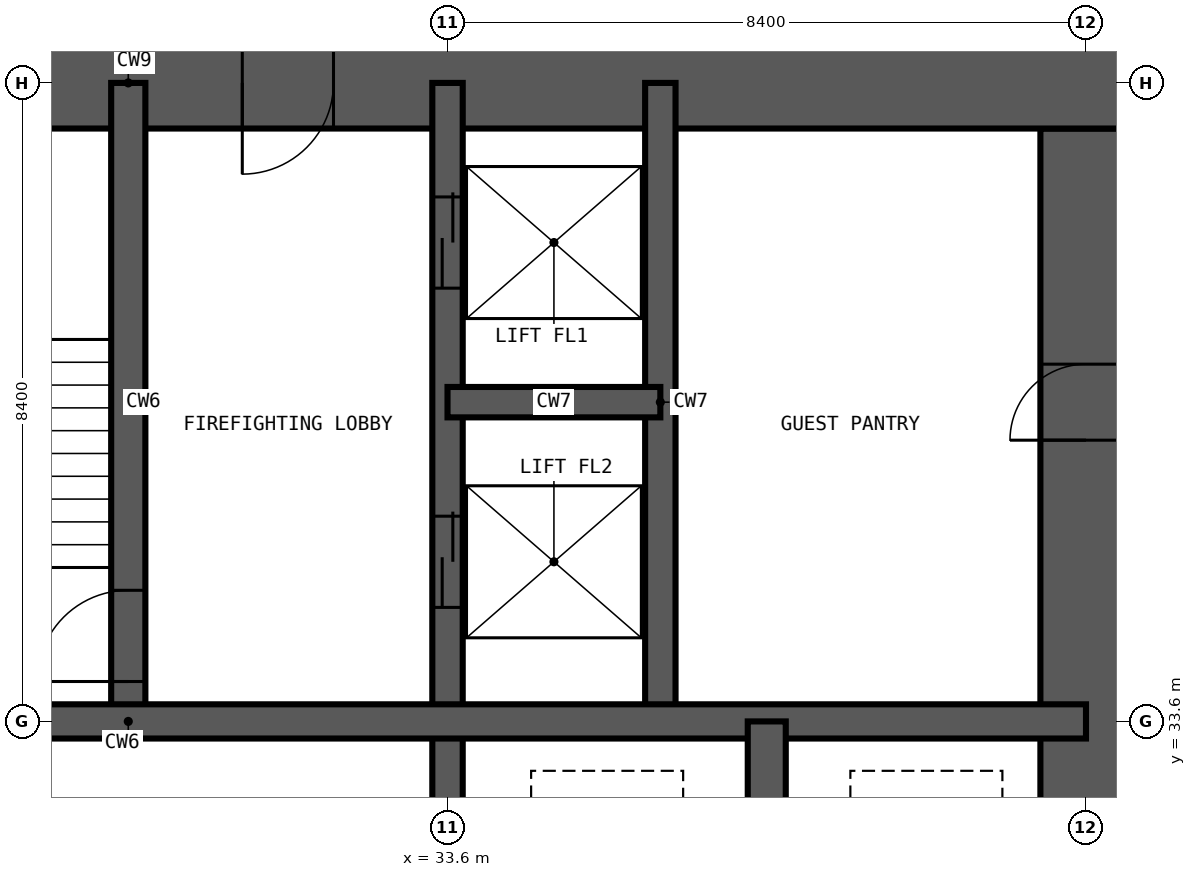
"""IFC4 building model, lengths in metres.
Left out: names, types, materials, properties, quantities, classifications, styles, units other than length and angle.
Written with IfcOpenShell. Run it as: python <this file> out.ifc"""

import sys

from ifc_helpers import new_model, si_unit, direction, frame, frame_2d, origin, place, context, subcontext, project, spatial, rectangle, extrude, element, fill, save


model = new_model("IFC4")
c1 = context("Model", 3, precision=1e-05, world=origin(), true_north=direction((0.0, 1.0)))
c2 = subcontext(c1, "Body", "Model", "MODEL_VIEW")
j1 = project(units=[si_unit("LENGTHUNIT", "METRE"), si_unit("PLANEANGLEUNIT", "RADIAN")], contexts=[c1])
p1 = place(None, origin())
s1 = spatial("IfcSite", under=j1, at=p1, CompositionType="ELEMENT")
p2 = place(p1, origin())
s2 = spatial("IfcBuilding", under=s1, at=p2, CompositionType="ELEMENT")
p3 = place(p2, frame((0.0, 0.0, 159.0)))
s3 = spatial("IfcBuildingStorey", under=s2, at=p3, CompositionType="ELEMENT", Elevation=159.0)
p4 = place(p3, frame((42.0, 17.4, -0.35), z_axis=(0.0, 0.0, 1.0), x_axis=(0.0, 1.0, 0.0)))
e1 = element("IfcWall", 1, at=p4, inside=s3, PredefinedType="SHEAR", context=c2, shape_type="SweptSolid", body=[
    extrude(rectangle(XDim=24.0, YDim=1.2, at=frame_2d((12.0, 0.0))), origin(), (0.0, 0.0, 1.0), 3.6),
])
p5 = place(p4, frame((0.2, 0.0, 0.35)))
e2 = element("IfcOpeningElement", 2, at=p5, cuts=e1, PredefinedType="OPENING", context=c2, shape_type="SweptSolid", body=[
    extrude(rectangle(XDim=1.2, YDim=2.2, at=frame_2d((0.6, 1.1))), frame((0.0, 0.61, 0.0), z_axis=(0.0, -1.0, 0.0), x_axis=(1.0, 0.0, 0.0)), (0.0, 0.0, 1.0), 1.22),
])
p6 = place(p4, frame((11.5, 0.0, 0.35)))
e3 = element("IfcOpeningElement", 3, at=p6, cuts=e1, PredefinedType="OPENING", context=c2, shape_type="SweptSolid", body=[
    extrude(rectangle(XDim=1.0, YDim=2.1, at=frame_2d((0.5, 1.05))), frame((0.0, 0.61, 0.0), z_axis=(0.0, -1.0, 0.0), x_axis=(1.0, 0.0, 0.0)), (0.0, 0.0, 1.0), 1.22),
])
p7 = place(p4, frame((19.9, 0.0, 0.35)))
e4 = element("IfcOpeningElement", 4, at=p7, cuts=e1, PredefinedType="OPENING", context=c2, shape_type="SweptSolid", body=[
    extrude(rectangle(XDim=1.0, YDim=2.1, at=frame_2d((0.5, 1.05))), frame((0.0, 0.61, 0.0), z_axis=(0.0, -1.0, 0.0), x_axis=(1.0, 0.0, 0.0)), (0.0, 0.0, 1.0), 1.22),
])
p8 = place(p3, frame((42.6, 42.0, -0.35), z_axis=(0.0, 0.0, 1.0), x_axis=(-1.0, 0.0, 0.0)))
e5 = element("IfcWall", 5, at=p8, inside=s3, PredefinedType="SHEAR", context=c2, shape_type="SweptSolid", body=[
    extrude(rectangle(XDim=26.4, YDim=1.2, at=frame_2d((13.2, 0.0))), origin(), (0.0, 0.0, 1.0), 3.6),
])
p9 = place(p8, frame((21.1, 0.0, 0.35)))
e6 = element("IfcOpeningElement", 6, at=p9, cuts=e5, PredefinedType="OPENING", context=c2, shape_type="SweptSolid", body=[
    extrude(rectangle(XDim=1.0, YDim=2.1, at=frame_2d((0.5, 1.05))), frame((0.0, 0.61, 0.0), z_axis=(0.0, -1.0, 0.0), x_axis=(1.0, 0.0, 0.0)), (0.0, 0.0, 1.0), 1.22),
])
p10 = place(p8, frame((10.5, 0.0, 0.35)))
e7 = element("IfcOpeningElement", 7, at=p10, cuts=e5, PredefinedType="OPENING", context=c2, shape_type="SweptSolid", body=[
    extrude(rectangle(XDim=1.2, YDim=2.2, at=frame_2d((0.6, 1.1))), frame((0.0, 0.61, 0.0), z_axis=(0.0, -1.0, 0.0), x_axis=(1.0, 0.0, 0.0)), (0.0, 0.0, 1.0), 1.22),
])
p11 = place(p3, frame((33.6, 16.8, -0.35), z_axis=(0.0, 0.0, 1.0), x_axis=(0.0, 1.0, 0.0)))
e8 = element("IfcWall", 8, at=p11, inside=s3, PredefinedType="SHEAR", context=c2, shape_type="SweptSolid", body=[
    extrude(rectangle(XDim=25.2, YDim=0.4, at=frame_2d((12.6, 0.0))), origin(), (0.0, 0.0, 1.0), 3.6),
])
p12 = place(p11, frame((22.5, 0.0, 0.35)))
e9 = element("IfcOpeningElement", 9, at=p12, cuts=e8, PredefinedType="OPENING", context=c2, shape_type="SweptSolid", body=[
    extrude(rectangle(XDim=1.2, YDim=2.2, at=frame_2d((0.6, 1.1))), frame((0.0, 0.21, 0.0), z_axis=(0.0, -1.0, 0.0), x_axis=(1.0, 0.0, 0.0)), (0.0, 0.0, 1.0), 0.42),
])
p13 = place(p11, frame((18.3, 0.0, 0.35)))
e10 = element("IfcOpeningElement", 10, at=p13, cuts=e8, PredefinedType="OPENING", context=c2, shape_type="SweptSolid", body=[
    extrude(rectangle(XDim=1.2, YDim=2.2, at=frame_2d((0.6, 1.1))), frame((0.0, 0.21, 0.0), z_axis=(0.0, -1.0, 0.0), x_axis=(1.0, 0.0, 0.0)), (0.0, 0.0, 1.0), 0.42),
])
p14 = place(p11, frame((12.1, 0.0, 0.35)))
e11 = element("IfcOpeningElement", 11, at=p14, cuts=e8, PredefinedType="OPENING", context=c2, shape_type="SweptSolid", body=[
    extrude(rectangle(XDim=1.0, YDim=2.1, at=frame_2d((0.5, 1.05))), frame((0.0, 0.21, 0.0), z_axis=(0.0, -1.0, 0.0), x_axis=(1.0, 0.0, 0.0)), (0.0, 0.0, 1.0), 0.42),
])
p15 = place(p3, frame((36.4, 33.6, -0.35), z_axis=(0.0, 0.0, 1.0), x_axis=(0.0, 1.0, 0.0)))
e12 = element("IfcWall", 12, at=p15, inside=s3, PredefinedType="SHEAR", context=c2, shape_type="SweptSolid", body=[
    extrude(rectangle(XDim=8.4, YDim=0.4, at=frame_2d((4.2, 0.0))), origin(), (0.0, 0.0, 1.0), 3.6),
])
p16 = place(p3, frame((33.6, 37.8, -0.35), z_axis=(0.0, 0.0, 1.0), x_axis=(1.0, 0.0, 0.0)))
e13 = element("IfcWall", 13, at=p16, inside=s3, PredefinedType="SHEAR", context=c2, shape_type="SweptSolid", body=[
    extrude(rectangle(XDim=2.8, YDim=0.4, at=frame_2d((1.4, 0.0))), origin(), (0.0, 0.0, 1.0), 3.6),
])
p17 = place(p3, frame((29.4, 33.6, -0.35), z_axis=(0.0, 0.0, 1.0), x_axis=(0.0, 1.0, 0.0)))
e14 = element("IfcWall", 14, at=p17, inside=s3, PredefinedType="SHEAR", context=c2, shape_type="SweptSolid", body=[
    extrude(rectangle(XDim=8.4, YDim=0.45, at=frame_2d((4.2, 0.0))), origin(), (0.0, 0.0, 1.0), 3.6),
])
p18 = place(p17, frame((0.525, 0.0, 0.35)))
e15 = element("IfcOpeningElement", 15, at=p18, cuts=e14, PredefinedType="OPENING", context=c2, shape_type="SweptSolid", body=[
    extrude(rectangle(XDim=1.2, YDim=2.2, at=frame_2d((0.6, 1.1))), frame((0.0, 0.235, 0.0), z_axis=(0.0, -1.0, 0.0), x_axis=(1.0, 0.0, 0.0)), (0.0, 0.0, 1.0), 0.47),
])
p19 = place(p3, frame((16.8, 33.6, -0.35), z_axis=(0.0, 0.0, 1.0), x_axis=(1.0, 0.0, 0.0)))
e16 = element("IfcWall", 16, at=p19, inside=s3, PredefinedType="SHEAR", context=c2, shape_type="SweptSolid", body=[
    extrude(rectangle(XDim=25.2, YDim=0.45, at=frame_2d((12.6, 0.0))), origin(), (0.0, 0.0, 1.0), 3.6),
])
p20 = place(p3, frame((37.8, 30.8, -0.35), z_axis=(0.0, 0.0, 1.0), x_axis=(0.0, 1.0, 0.0)))
e17 = element("IfcWall", 17, at=p20, inside=s3, PredefinedType="SHEAR", context=c2, shape_type="SweptSolid", body=[
    extrude(rectangle(XDim=2.8, YDim=0.5, at=frame_2d((1.4, 0.0))), origin(), (0.0, 0.0, 1.0), 3.6),
])
p21 = place(p18, origin())
e18 = element("IfcDoor", 18, at=p21, inside=s3, OperationType="SINGLE_SWING_LEFT", PredefinedType="DOOR", context=c2, shape_type="SweptSolid", body=[
    extrude(rectangle(XDim=1.2, YDim=2.2, at=frame_2d((0.6, 1.1))), frame((0.0, 0.025, 0.0), z_axis=(0.0, -1.0, 0.0), x_axis=(1.0, 0.0, 0.0)), (0.0, 0.0, 1.0), 0.05),
])
fill(e15, e18)
p22 = place(p12, origin())
e19 = element("IfcDoor", 19, at=p22, inside=s3, OperationType="DOUBLE_DOOR_SLIDING", PredefinedType="DOOR", context=c2, shape_type="SweptSolid", body=[
    extrude(rectangle(XDim=1.2, YDim=2.2, at=frame_2d((0.6, 1.1))), frame((0.0, 0.025, 0.0), z_axis=(0.0, -1.0, 0.0), x_axis=(1.0, 0.0, 0.0)), (0.0, 0.0, 1.0), 0.05),
])
fill(e9, e19)
p23 = place(p13, origin())
e20 = element("IfcDoor", 20, at=p23, inside=s3, OperationType="DOUBLE_DOOR_SLIDING", PredefinedType="DOOR", context=c2, shape_type="SweptSolid", body=[
    extrude(rectangle(XDim=1.2, YDim=2.2, at=frame_2d((0.6, 1.1))), frame((0.0, 0.025, 0.0), z_axis=(0.0, -1.0, 0.0), x_axis=(1.0, 0.0, 0.0)), (0.0, 0.0, 1.0), 0.05),
])
fill(e10, e20)
p24 = place(p10, origin())
e21 = element("IfcDoor", 21, at=p24, inside=s3, OperationType="SINGLE_SWING_RIGHT", PredefinedType="DOOR", context=c2, shape_type="SweptSolid", body=[
    extrude(rectangle(XDim=1.2, YDim=2.2, at=frame_2d((0.6, 1.1))), frame((0.0, 0.025, 0.0), z_axis=(0.0, -1.0, 0.0), x_axis=(1.0, 0.0, 0.0)), (0.0, 0.0, 1.0), 0.05),
])
fill(e7, e21)
p25 = place(p7, origin())
e22 = element("IfcDoor", 22, at=p25, inside=s3, OperationType="SINGLE_SWING_LEFT", PredefinedType="DOOR", context=c2, shape_type="SweptSolid", body=[
    extrude(rectangle(XDim=1.0, YDim=2.1, at=frame_2d((0.5, 1.05))), frame((0.0, 0.025, 0.0), z_axis=(0.0, -1.0, 0.0), x_axis=(1.0, 0.0, 0.0)), (0.0, 0.0, 1.0), 0.05),
])
fill(e4, e22)
save(model, sys.argv[1])
